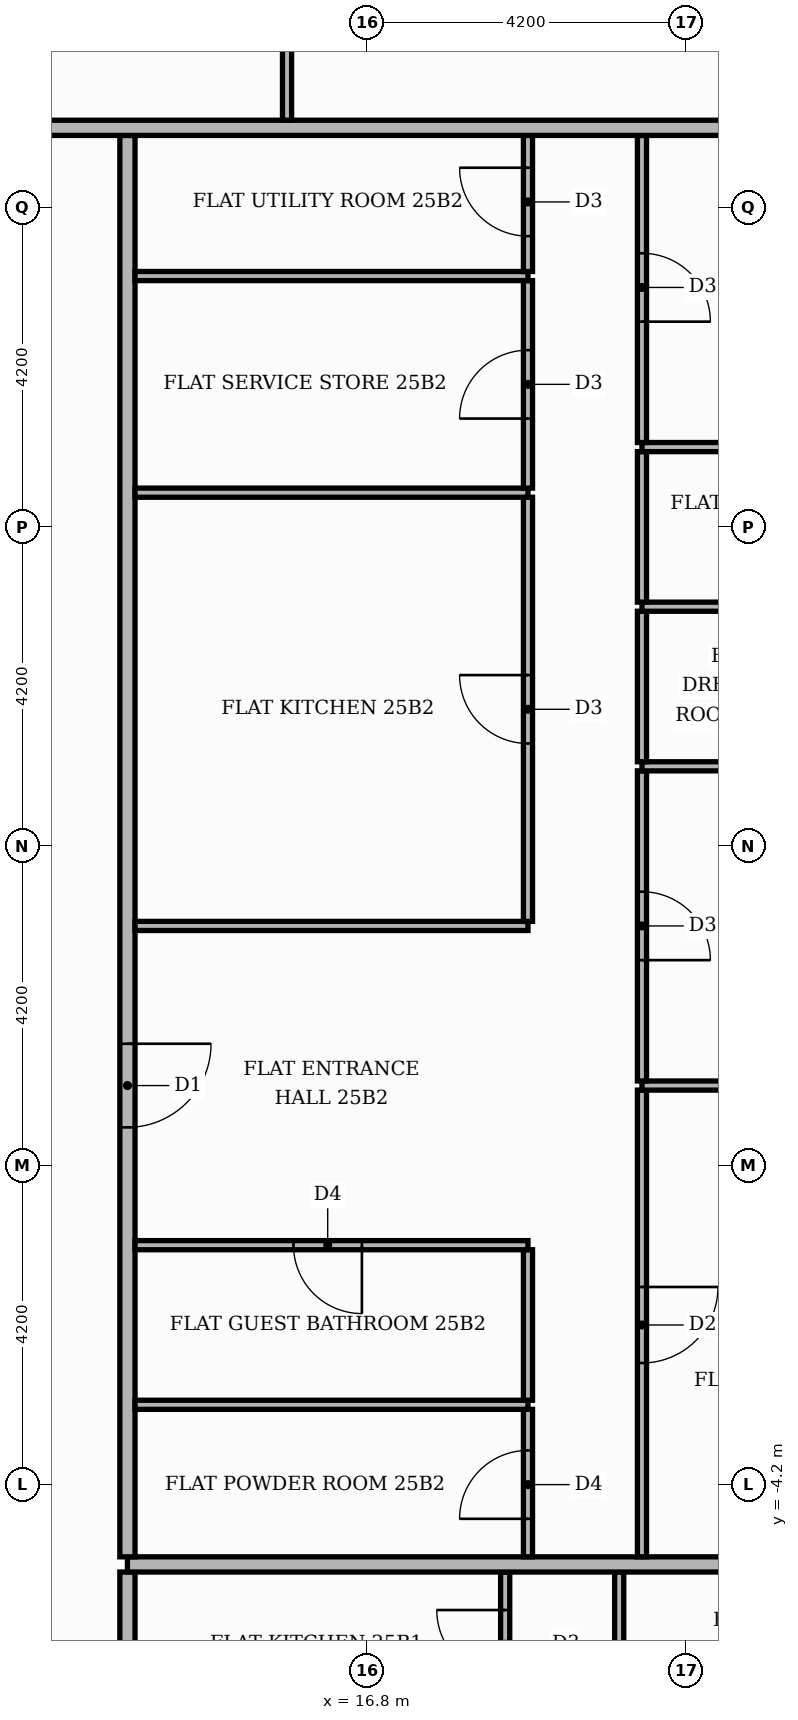
"""IFC4 building model, lengths in metres.
Left out: names, types, materials, properties, quantities, classifications, styles, units other than length and angle.
Written with IfcOpenShell. Run it as: python <this file> out.ifc"""

import sys

from ifc_helpers import new_model, si_unit, direction, frame, frame_2d, origin, place, context, subcontext, project, spatial, rectangle, extrude, element, fill, save


model = new_model("IFC4")
c1 = context("Model", 3, precision=1e-05, world=origin(), true_north=direction((0.0, 1.0)))
c2 = subcontext(c1, "Body", "Model", "MODEL_VIEW")
j1 = project(units=[si_unit("LENGTHUNIT", "METRE"), si_unit("PLANEANGLEUNIT", "RADIAN")], contexts=[c1])
p1 = place(None, origin())
s1 = spatial("IfcSite", under=j1, at=p1, CompositionType="ELEMENT")
p2 = place(p1, origin())
s2 = spatial("IfcBuilding", under=s1, at=p2, CompositionType="ELEMENT")
p3 = place(p2, frame((0.0, 0.0, 106.5)))
s3 = spatial("IfcBuildingStorey", under=s2, at=p3, CompositionType="ELEMENT", Elevation=106.5)
p4 = place(p3, frame((13.65, -13.55, 0.0), z_axis=(0.0, 0.0, 1.0), x_axis=(0.0, 1.0, 0.0)))
e1 = element("IfcWall", 1, at=p4, inside=s3, PredefinedType="PARTITIONING", context=c2, shape_type="SweptSolid", body=[
    extrude(rectangle(XDim=8.2, YDim=0.2, at=frame_2d((4.1, 0.0))), origin(), (0.0, 0.0, 1.0), 3.48),
])
p5 = place(p4, frame((1.45, 0.0, 0.0)))
e2 = element("IfcOpeningElement", 2, at=p5, cuts=e1, PredefinedType="OPENING", context=c2, shape_type="SweptSolid", body=[
    extrude(rectangle(XDim=1.1, YDim=2.4, at=frame_2d((0.55, 1.2))), frame((0.0, 0.11, 0.0), z_axis=(0.0, -1.0, 0.0), x_axis=(1.0, 0.0, 0.0)), (0.0, 0.0, 1.0), 0.22),
])
p6 = place(p3, frame((18.62, -7.29, 0.0), z_axis=(0.0, 0.0, 1.0), x_axis=(0.0, 1.0, 0.0)))
e3 = element("IfcWall", 3, at=p6, inside=s3, PredefinedType="PARTITIONING", context=c2, shape_type="SweptSolid", body=[
    extrude(rectangle(XDim=1.94, YDim=0.12, at=frame_2d((0.97, 0.0))), origin(), (0.0, 0.0, 1.0), 3.48),
])
p7 = place(p6, frame((0.54, 0.0, 0.0)))
e4 = element("IfcOpeningElement", 4, at=p7, cuts=e3, PredefinedType="OPENING", context=c2, shape_type="SweptSolid", body=[
    extrude(rectangle(XDim=0.9, YDim=2.1, at=frame_2d((0.45, 1.05))), frame((0.0, 0.07, 0.0), z_axis=(0.0, -1.0, 0.0), x_axis=(1.0, 0.0, 0.0)), (0.0, 0.0, 1.0), 0.14),
])
p8 = place(p3, frame((20.12, -7.29, 0.0), z_axis=(0.0, 0.0, 1.0), x_axis=(0.0, 1.0, 0.0)))
e5 = element("IfcWall", 5, at=p8, inside=s3, PredefinedType="PARTITIONING", context=c2, shape_type="SweptSolid", body=[
    extrude(rectangle(XDim=1.94, YDim=0.12, at=frame_2d((0.97, 0.0))), origin(), (0.0, 0.0, 1.0), 3.48),
])
p9 = place(p3, frame((13.65, -5.25, 0.0), z_axis=(0.0, 0.0, 1.0), x_axis=(1.0, 0.0, 0.0)))
e6 = element("IfcWall", 6, at=p9, inside=s3, PredefinedType="PARTITIONING", context=c2, shape_type="SweptSolid", body=[
    extrude(rectangle(XDim=11.77, YDim=0.2, at=frame_2d((5.885, 0.0))), origin(), (0.0, 0.0, 1.0), 3.48),
])
p10 = place(p3, frame((13.65, -5.15, 0.0), z_axis=(0.0, 0.0, 1.0), x_axis=(0.0, 1.0, 0.0)))
e7 = element("IfcWall", 7, at=p10, inside=s3, PredefinedType="PARTITIONING", context=c2, shape_type="SweptSolid", body=[
    extrude(rectangle(XDim=18.7, YDim=0.2, at=frame_2d((9.35, 0.0))), origin(), (0.0, 0.0, 1.0), 3.48),
])
p11 = place(p10, frame((5.65, 0.0, 0.0)))
e8 = element("IfcOpeningElement", 8, at=p11, cuts=e7, PredefinedType="OPENING", context=c2, shape_type="SweptSolid", body=[
    extrude(rectangle(XDim=1.1, YDim=2.4, at=frame_2d((0.55, 1.2))), frame((0.0, 0.11, 0.0), z_axis=(0.0, -1.0, 0.0), x_axis=(1.0, 0.0, 0.0)), (0.0, 0.0, 1.0), 0.22),
])
p12 = place(p3, frame((18.92, -5.15, 0.0), z_axis=(0.0, 0.0, 1.0), x_axis=(0.0, 1.0, 0.0)))
e9 = element("IfcWall", 9, at=p12, inside=s3, PredefinedType="PARTITIONING", context=c2, shape_type="SweptSolid", body=[
    extrude(rectangle(XDim=1.94, YDim=0.12, at=frame_2d((0.97, 0.0))), origin(), (0.0, 0.0, 1.0), 3.48),
])
p13 = place(p12, frame((0.5, 0.0, 0.0)))
e10 = element("IfcOpeningElement", 10, at=p13, cuts=e9, PredefinedType="OPENING", context=c2, shape_type="SweptSolid", body=[
    extrude(rectangle(XDim=0.9, YDim=2.1, at=frame_2d((0.45, 1.05))), frame((0.0, 0.07, 0.0), z_axis=(0.0, -1.0, 0.0), x_axis=(1.0, 0.0, 0.0)), (0.0, 0.0, 1.0), 0.14),
])
p14 = place(p3, frame((20.42, -5.15, 0.0), z_axis=(0.0, 0.0, 1.0), x_axis=(0.0, 1.0, 0.0)))
e11 = element("IfcWall", 11, at=p14, inside=s3, PredefinedType="PARTITIONING", context=c2, shape_type="SweptSolid", body=[
    extrude(rectangle(XDim=6.14, YDim=0.12, at=frame_2d((3.07, 0.0))), origin(), (0.0, 0.0, 1.0), 3.48),
])
p15 = place(p14, frame((2.55, 0.0, 0.0)))
e12 = element("IfcOpeningElement", 12, at=p15, cuts=e11, PredefinedType="OPENING", context=c2, shape_type="SweptSolid", body=[
    extrude(rectangle(XDim=1.0, YDim=2.1, at=frame_2d((0.5, 1.05))), frame((0.0, 0.07, 0.0), z_axis=(0.0, -1.0, 0.0), x_axis=(1.0, 0.0, 0.0)), (0.0, 0.0, 1.0), 0.14),
])
p16 = place(p3, frame((13.75, -3.15, 0.0), z_axis=(0.0, 0.0, 1.0), x_axis=(1.0, 0.0, 0.0)))
e13 = element("IfcWall", 13, at=p16, inside=s3, PredefinedType="PARTITIONING", context=c2, shape_type="SweptSolid", body=[
    extrude(rectangle(XDim=5.17, YDim=0.12, at=frame_2d((2.585, 0.0))), origin(), (0.0, 0.0, 1.0), 3.48),
])
p17 = place(p3, frame((18.92, -3.09, 0.0), z_axis=(0.0, 0.0, 1.0), x_axis=(0.0, 1.0, 0.0)))
e14 = element("IfcWall", 14, at=p17, inside=s3, PredefinedType="PARTITIONING", context=c2, shape_type="SweptSolid", body=[
    extrude(rectangle(XDim=1.98, YDim=0.12, at=frame_2d((0.99, 0.0))), origin(), (0.0, 0.0, 1.0), 3.48),
])
p18 = place(p3, frame((13.75, -1.05, 0.0), z_axis=(0.0, 0.0, 1.0), x_axis=(1.0, 0.0, 0.0)))
e15 = element("IfcWall", 15, at=p18, inside=s3, PredefinedType="PARTITIONING", context=c2, shape_type="SweptSolid", body=[
    extrude(rectangle(XDim=5.17, YDim=0.12, at=frame_2d((2.585, 0.0))), origin(), (0.0, 0.0, 1.0), 3.48),
])
p19 = place(p18, frame((2.085, 0.0, 0.0)))
e16 = element("IfcOpeningElement", 16, at=p19, cuts=e15, PredefinedType="OPENING", context=c2, shape_type="SweptSolid", body=[
    extrude(rectangle(XDim=0.9, YDim=2.1, at=frame_2d((0.45, 1.05))), frame((0.0, 0.07, 0.0), z_axis=(0.0, -1.0, 0.0), x_axis=(1.0, 0.0, 0.0)), (0.0, 0.0, 1.0), 0.14),
])
p20 = place(p3, frame((20.42, 1.05, 0.0), z_axis=(0.0, 0.0, 1.0), x_axis=(1.0, 0.0, 0.0)))
e17 = element("IfcWall", 17, at=p20, inside=s3, PredefinedType="PARTITIONING", context=c2, shape_type="SweptSolid", body=[
    extrude(rectangle(XDim=5.0, YDim=0.12, at=frame_2d((2.5, 0.0))), origin(), (0.0, 0.0, 1.0), 3.48),
])
p21 = place(p3, frame((20.42, 1.11, 0.0), z_axis=(0.0, 0.0, 1.0), x_axis=(0.0, 1.0, 0.0)))
e18 = element("IfcWall", 18, at=p21, inside=s3, PredefinedType="PARTITIONING", context=c2, shape_type="SweptSolid", body=[
    extrude(rectangle(XDim=4.08, YDim=0.12, at=frame_2d((2.04, 0.0))), origin(), (0.0, 0.0, 1.0), 3.48),
])
p22 = place(p21, frame((1.59, 0.0, 0.0)))
e19 = element("IfcOpeningElement", 19, at=p22, cuts=e18, PredefinedType="OPENING", context=c2, shape_type="SweptSolid", body=[
    extrude(rectangle(XDim=0.9, YDim=2.1, at=frame_2d((0.45, 1.05))), frame((0.0, 0.07, 0.0), z_axis=(0.0, -1.0, 0.0), x_axis=(1.0, 0.0, 0.0)), (0.0, 0.0, 1.0), 0.14),
])
p23 = place(p3, frame((13.75, 3.15, 0.0), z_axis=(0.0, 0.0, 1.0), x_axis=(1.0, 0.0, 0.0)))
e20 = element("IfcWall", 20, at=p23, inside=s3, PredefinedType="PARTITIONING", context=c2, shape_type="SweptSolid", body=[
    extrude(rectangle(XDim=5.17, YDim=0.12, at=frame_2d((2.585, 0.0))), origin(), (0.0, 0.0, 1.0), 3.48),
])
p24 = place(p3, frame((18.92, 3.21, 0.0), z_axis=(0.0, 0.0, 1.0), x_axis=(0.0, 1.0, 0.0)))
e21 = element("IfcWall", 21, at=p24, inside=s3, PredefinedType="PARTITIONING", context=c2, shape_type="SweptSolid", body=[
    extrude(rectangle(XDim=5.58, YDim=0.12, at=frame_2d((2.79, 0.0))), origin(), (0.0, 0.0, 1.0), 3.48),
])
p25 = place(p24, frame((2.34, 0.0, 0.0)))
e22 = element("IfcOpeningElement", 22, at=p25, cuts=e21, PredefinedType="OPENING", context=c2, shape_type="SweptSolid", body=[
    extrude(rectangle(XDim=0.9, YDim=2.1, at=frame_2d((0.45, 1.05))), frame((0.0, 0.07, 0.0), z_axis=(0.0, -1.0, 0.0), x_axis=(1.0, 0.0, 0.0)), (0.0, 0.0, 1.0), 0.14),
])
p26 = place(p3, frame((20.42, 5.25, 0.0), z_axis=(0.0, 0.0, 1.0), x_axis=(1.0, 0.0, 0.0)))
e23 = element("IfcWall", 23, at=p26, inside=s3, PredefinedType="PARTITIONING", context=c2, shape_type="SweptSolid", body=[
    extrude(rectangle(XDim=5.0, YDim=0.12, at=frame_2d((2.5, 0.0))), origin(), (0.0, 0.0, 1.0), 3.48),
])
p27 = place(p26, frame((2.2, 0.0, 0.0)))
e24 = element("IfcOpeningElement", 24, at=p27, cuts=e23, PredefinedType="OPENING", context=c2, shape_type="SweptSolid", body=[
    extrude(rectangle(XDim=0.9, YDim=2.1, at=frame_2d((0.45, 1.05))), frame((0.0, 0.07, 0.0), z_axis=(0.0, -1.0, 0.0), x_axis=(1.0, 0.0, 0.0)), (0.0, 0.0, 1.0), 0.14),
])
p28 = place(p3, frame((20.42, 5.31, 0.0), z_axis=(0.0, 0.0, 1.0), x_axis=(0.0, 1.0, 0.0)))
e25 = element("IfcWall", 25, at=p28, inside=s3, PredefinedType="PARTITIONING", context=c2, shape_type="SweptSolid", body=[
    extrude(rectangle(XDim=1.98, YDim=0.12, at=frame_2d((0.99, 0.0))), origin(), (0.0, 0.0, 1.0), 3.48),
])
p29 = place(p3, frame((20.42, 7.35, 0.0), z_axis=(0.0, 0.0, 1.0), x_axis=(1.0, 0.0, 0.0)))
e26 = element("IfcWall", 26, at=p29, inside=s3, PredefinedType="PARTITIONING", context=c2, shape_type="SweptSolid", body=[
    extrude(rectangle(XDim=5.0, YDim=0.12, at=frame_2d((2.5, 0.0))), origin(), (0.0, 0.0, 1.0), 3.48),
])
p30 = place(p29, frame((2.2, 0.0, 0.0)))
e27 = element("IfcOpeningElement", 27, at=p30, cuts=e26, PredefinedType="OPENING", context=c2, shape_type="SweptSolid", body=[
    extrude(rectangle(XDim=0.9, YDim=2.1, at=frame_2d((0.45, 1.05))), frame((0.0, 0.07, 0.0), z_axis=(0.0, -1.0, 0.0), x_axis=(1.0, 0.0, 0.0)), (0.0, 0.0, 1.0), 0.14),
])
p31 = place(p3, frame((20.42, 7.41, 0.0), z_axis=(0.0, 0.0, 1.0), x_axis=(0.0, 1.0, 0.0)))
e28 = element("IfcWall", 28, at=p31, inside=s3, PredefinedType="PARTITIONING", context=c2, shape_type="SweptSolid", body=[
    extrude(rectangle(XDim=1.98, YDim=0.12, at=frame_2d((0.99, 0.0))), origin(), (0.0, 0.0, 1.0), 3.48),
])
p32 = place(p3, frame((13.75, 8.85, 0.0), z_axis=(0.0, 0.0, 1.0), x_axis=(1.0, 0.0, 0.0)))
e29 = element("IfcWall", 29, at=p32, inside=s3, PredefinedType="PARTITIONING", context=c2, shape_type="SweptSolid", body=[
    extrude(rectangle(XDim=5.17, YDim=0.12, at=frame_2d((2.585, 0.0))), origin(), (0.0, 0.0, 1.0), 3.48),
])
p33 = place(p3, frame((18.92, 8.91, 0.0), z_axis=(0.0, 0.0, 1.0), x_axis=(0.0, 1.0, 0.0)))
e30 = element("IfcWall", 30, at=p33, inside=s3, PredefinedType="PARTITIONING", context=c2, shape_type="SweptSolid", body=[
    extrude(rectangle(XDim=2.73, YDim=0.12, at=frame_2d((1.365, 0.0))), origin(), (0.0, 0.0, 1.0), 3.48),
])
p34 = place(p33, frame((0.915, 0.0, 0.0)))
e31 = element("IfcOpeningElement", 31, at=p34, cuts=e30, PredefinedType="OPENING", context=c2, shape_type="SweptSolid", body=[
    extrude(rectangle(XDim=0.9, YDim=2.1, at=frame_2d((0.45, 1.05))), frame((0.0, 0.07, 0.0), z_axis=(0.0, -1.0, 0.0), x_axis=(1.0, 0.0, 0.0)), (0.0, 0.0, 1.0), 0.14),
])
p35 = place(p3, frame((20.42, 9.45, 0.0), z_axis=(0.0, 0.0, 1.0), x_axis=(1.0, 0.0, 0.0)))
e32 = element("IfcWall", 32, at=p35, inside=s3, PredefinedType="PARTITIONING", context=c2, shape_type="SweptSolid", body=[
    extrude(rectangle(XDim=5.0, YDim=0.12, at=frame_2d((2.5, 0.0))), origin(), (0.0, 0.0, 1.0), 3.48),
])
p36 = place(p3, frame((20.42, 9.51, 0.0), z_axis=(0.0, 0.0, 1.0), x_axis=(0.0, 1.0, 0.0)))
e33 = element("IfcWall", 33, at=p36, inside=s3, PredefinedType="PARTITIONING", context=c2, shape_type="SweptSolid", body=[
    extrude(rectangle(XDim=4.04, YDim=0.12, at=frame_2d((2.02, 0.0))), origin(), (0.0, 0.0, 1.0), 3.48),
])
p37 = place(p36, frame((1.59, 0.0, 0.0)))
e34 = element("IfcOpeningElement", 34, at=p37, cuts=e33, PredefinedType="OPENING", context=c2, shape_type="SweptSolid", body=[
    extrude(rectangle(XDim=0.9, YDim=2.1, at=frame_2d((0.45, 1.05))), frame((0.0, 0.07, 0.0), z_axis=(0.0, -1.0, 0.0), x_axis=(1.0, 0.0, 0.0)), (0.0, 0.0, 1.0), 0.14),
])
p38 = place(p3, frame((13.75, 11.7, 0.0), z_axis=(0.0, 0.0, 1.0), x_axis=(1.0, 0.0, 0.0)))
e35 = element("IfcWall", 35, at=p38, inside=s3, PredefinedType="PARTITIONING", context=c2, shape_type="SweptSolid", body=[
    extrude(rectangle(XDim=5.17, YDim=0.12, at=frame_2d((2.585, 0.0))), origin(), (0.0, 0.0, 1.0), 3.48),
])
p39 = place(p3, frame((18.92, 11.76, 0.0), z_axis=(0.0, 0.0, 1.0), x_axis=(0.0, 1.0, 0.0)))
e36 = element("IfcWall", 36, at=p39, inside=s3, PredefinedType="PARTITIONING", context=c2, shape_type="SweptSolid", body=[
    extrude(rectangle(XDim=1.79, YDim=0.12, at=frame_2d((0.895, 0.0))), origin(), (0.0, 0.0, 1.0), 3.48),
])
p40 = place(p39, frame((0.465, 0.0, 0.0)))
e37 = element("IfcOpeningElement", 37, at=p40, cuts=e36, PredefinedType="OPENING", context=c2, shape_type="SweptSolid", body=[
    extrude(rectangle(XDim=0.9, YDim=2.1, at=frame_2d((0.45, 1.05))), frame((0.0, 0.07, 0.0), z_axis=(0.0, -1.0, 0.0), x_axis=(1.0, 0.0, 0.0)), (0.0, 0.0, 1.0), 0.14),
])
p41 = place(p3, frame((-13.65, 13.65, 0.0), z_axis=(0.0, 0.0, 1.0), x_axis=(1.0, 0.0, 0.0)))
e38 = element("IfcWall", 38, at=p41, inside=s3, PredefinedType="PARTITIONING", context=c2, shape_type="SweptSolid", body=[
    extrude(rectangle(XDim=39.07, YDim=0.2, at=frame_2d((19.535, 0.0))), origin(), (0.0, 0.0, 1.0), 3.48),
])
p42 = place(p41, frame((24.65, 0.0, 0.0)))
e39 = element("IfcOpeningElement", 39, at=p42, cuts=e38, PredefinedType="OPENING", context=c2, shape_type="SweptSolid", body=[
    extrude(rectangle(XDim=1.1, YDim=2.4, at=frame_2d((0.55, 1.2))), frame((0.0, 0.11, 0.0), z_axis=(0.0, -1.0, 0.0), x_axis=(1.0, 0.0, 0.0)), (0.0, 0.0, 1.0), 0.22),
])
p43 = place(p41, frame((14.15, 0.0, 0.0)))
e40 = element("IfcOpeningElement", 40, at=p43, cuts=e38, PredefinedType="OPENING", context=c2, shape_type="SweptSolid", body=[
    extrude(rectangle(XDim=1.1, YDim=2.4, at=frame_2d((0.55, 1.2))), frame((0.0, 0.11, 0.0), z_axis=(0.0, -1.0, 0.0), x_axis=(1.0, 0.0, 0.0)), (0.0, 0.0, 1.0), 0.22),
])
p44 = place(p3, frame((15.75, 13.75, 0.0), z_axis=(0.0, 0.0, 1.0), x_axis=(0.0, 1.0, 0.0)))
e41 = element("IfcWall", 41, at=p44, inside=s3, PredefinedType="PARTITIONING", context=c2, shape_type="SweptSolid", body=[
    extrude(rectangle(XDim=6.01, YDim=0.12, at=frame_2d((3.005, 0.0))), origin(), (0.0, 0.0, 1.0), 3.48),
])
p45 = place(p44, frame((2.485, 0.0, 0.0)))
e42 = element("IfcOpeningElement", 42, at=p45, cuts=e41, PredefinedType="OPENING", context=c2, shape_type="SweptSolid", body=[
    extrude(rectangle(XDim=1.0, YDim=2.1, at=frame_2d((0.5, 1.05))), frame((0.0, 0.07, 0.0), z_axis=(0.0, -1.0, 0.0), x_axis=(1.0, 0.0, 0.0)), (0.0, 0.0, 1.0), 0.14),
])
p46 = place(p7, origin())
e43 = element("IfcDoor", 43, at=p46, inside=s3, OperationType="SINGLE_SWING_RIGHT", PredefinedType="DOOR", context=c2, shape_type="SweptSolid", body=[
    extrude(rectangle(XDim=0.9, YDim=2.1, at=frame_2d((0.45, 1.05))), frame((0.0, 0.025, 0.0), z_axis=(0.0, -1.0, 0.0), x_axis=(1.0, 0.0, 0.0)), (0.0, 0.0, 1.0), 0.05),
])
fill(e4, e43)
p47 = place(p11, frame((1.1, 0.0, 0.0), z_axis=(0.0, 0.0, 1.0), x_axis=(-1.0, 0.0, 0.0)))
e44 = element("IfcDoor", 44, at=p47, inside=s3, OperationType="SINGLE_SWING_RIGHT", PredefinedType="DOOR", context=c2, shape_type="SweptSolid", body=[
    extrude(rectangle(XDim=1.1, YDim=2.4, at=frame_2d((0.55, 1.2))), frame((0.0, 0.025, 0.0), z_axis=(0.0, -1.0, 0.0), x_axis=(1.0, 0.0, 0.0)), (0.0, 0.0, 1.0), 0.05),
])
fill(e8, e44)
p48 = place(p13, origin())
e45 = element("IfcDoor", 45, at=p48, inside=s3, OperationType="SINGLE_SWING_LEFT", PredefinedType="DOOR", context=c2, shape_type="SweptSolid", body=[
    extrude(rectangle(XDim=0.9, YDim=2.1, at=frame_2d((0.45, 1.05))), frame((0.0, 0.025, 0.0), z_axis=(0.0, -1.0, 0.0), x_axis=(1.0, 0.0, 0.0)), (0.0, 0.0, 1.0), 0.05),
])
fill(e10, e45)
p49 = place(p19, frame((0.9, 0.0, 0.0), z_axis=(0.0, 0.0, 1.0), x_axis=(-1.0, 0.0, 0.0)))
e46 = element("IfcDoor", 46, at=p49, inside=s3, OperationType="SINGLE_SWING_RIGHT", PredefinedType="DOOR", context=c2, shape_type="SweptSolid", body=[
    extrude(rectangle(XDim=0.9, YDim=2.1, at=frame_2d((0.45, 1.05))), frame((0.0, 0.025, 0.0), z_axis=(0.0, -1.0, 0.0), x_axis=(1.0, 0.0, 0.0)), (0.0, 0.0, 1.0), 0.05),
])
fill(e16, e46)
p50 = place(p25, origin())
e47 = element("IfcDoor", 47, at=p50, inside=s3, OperationType="SINGLE_SWING_RIGHT", PredefinedType="DOOR", context=c2, shape_type="SweptSolid", body=[
    extrude(rectangle(XDim=0.9, YDim=2.1, at=frame_2d((0.45, 1.05))), frame((0.0, 0.025, 0.0), z_axis=(0.0, -1.0, 0.0), x_axis=(1.0, 0.0, 0.0)), (0.0, 0.0, 1.0), 0.05),
])
fill(e22, e47)
p51 = place(p34, origin())
e48 = element("IfcDoor", 48, at=p51, inside=s3, OperationType="SINGLE_SWING_LEFT", PredefinedType="DOOR", context=c2, shape_type="SweptSolid", body=[
    extrude(rectangle(XDim=0.9, YDim=2.1, at=frame_2d((0.45, 1.05))), frame((0.0, 0.025, 0.0), z_axis=(0.0, -1.0, 0.0), x_axis=(1.0, 0.0, 0.0)), (0.0, 0.0, 1.0), 0.05),
])
fill(e31, e48)
p52 = place(p40, origin())
e49 = element("IfcDoor", 49, at=p52, inside=s3, OperationType="SINGLE_SWING_RIGHT", PredefinedType="DOOR", context=c2, shape_type="SweptSolid", body=[
    extrude(rectangle(XDim=0.9, YDim=2.1, at=frame_2d((0.45, 1.05))), frame((0.0, 0.025, 0.0), z_axis=(0.0, -1.0, 0.0), x_axis=(1.0, 0.0, 0.0)), (0.0, 0.0, 1.0), 0.05),
])
fill(e37, e49)
p53 = place(p15, frame((1.0, 0.0, 0.0), z_axis=(0.0, 0.0, 1.0), x_axis=(-1.0, 0.0, 0.0)))
e50 = element("IfcDoor", 50, at=p53, inside=s3, OperationType="SINGLE_SWING_RIGHT", PredefinedType="DOOR", context=c2, shape_type="SweptSolid", body=[
    extrude(rectangle(XDim=1.0, YDim=2.1, at=frame_2d((0.5, 1.05))), frame((0.0, 0.025, 0.0), z_axis=(0.0, -1.0, 0.0), x_axis=(1.0, 0.0, 0.0)), (0.0, 0.0, 1.0), 0.05),
])
fill(e12, e50)
p54 = place(p22, frame((0.9, 0.0, 0.0), z_axis=(0.0, 0.0, 1.0), x_axis=(-1.0, 0.0, 0.0)))
e51 = element("IfcDoor", 51, at=p54, inside=s3, OperationType="SINGLE_SWING_LEFT", PredefinedType="DOOR", context=c2, shape_type="SweptSolid", body=[
    extrude(rectangle(XDim=0.9, YDim=2.1, at=frame_2d((0.45, 1.05))), frame((0.0, 0.025, 0.0), z_axis=(0.0, -1.0, 0.0), x_axis=(1.0, 0.0, 0.0)), (0.0, 0.0, 1.0), 0.05),
])
fill(e19, e51)
p55 = place(p37, frame((0.9, 0.0, 0.0), z_axis=(0.0, 0.0, 1.0), x_axis=(-1.0, 0.0, 0.0)))
e52 = element("IfcDoor", 52, at=p55, inside=s3, OperationType="SINGLE_SWING_LEFT", PredefinedType="DOOR", context=c2, shape_type="SweptSolid", body=[
    extrude(rectangle(XDim=0.9, YDim=2.1, at=frame_2d((0.45, 1.05))), frame((0.0, 0.025, 0.0), z_axis=(0.0, -1.0, 0.0), x_axis=(1.0, 0.0, 0.0)), (0.0, 0.0, 1.0), 0.05),
])
fill(e34, e52)
save(model, sys.argv[1])
